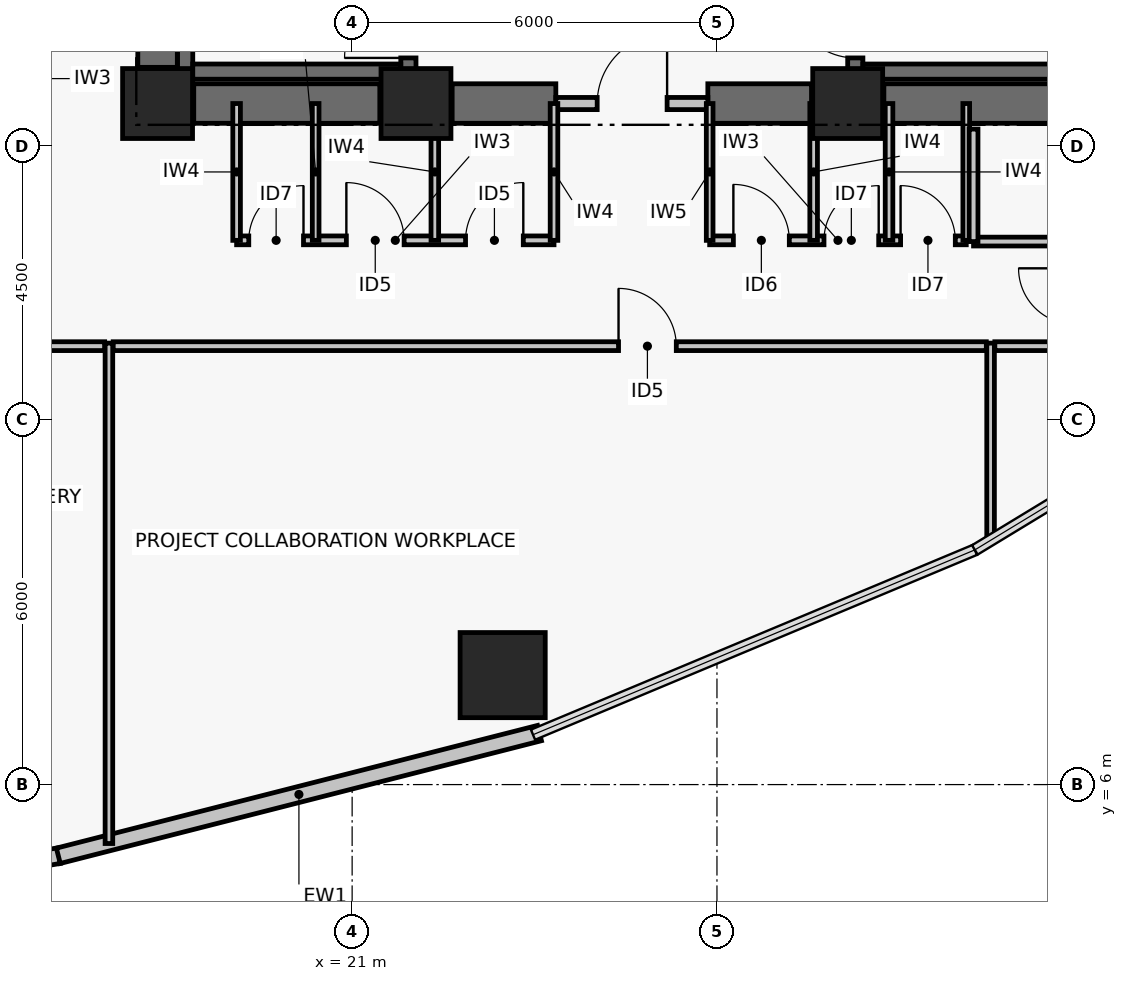
"""IFC4 building model, lengths in metres.
Left out: names, types, materials, properties, quantities, classifications, styles, units other than length and angle.
Written with IfcOpenShell. Run it as: python <this file> out.ifc"""

import sys

from ifc_helpers import new_model, si_unit, direction, frame, frame_2d, origin, origin_2d, place, context, subcontext, project, spatial, rectangle, hollow_rectangle, extrude, element, fill, save


model = new_model("IFC4")
c1 = context("Model", 3, precision=1e-05, world=origin(), true_north=direction((0.0, 1.0)))
c2 = subcontext(c1, "Body", "Model", "MODEL_VIEW")
j1 = project(units=[si_unit("LENGTHUNIT", "METRE"), si_unit("PLANEANGLEUNIT", "RADIAN")], contexts=[c1])
p1 = place(None, origin())
s1 = spatial("IfcSite", under=j1, at=p1, CompositionType="ELEMENT")
p2 = place(p1, origin())
s2 = spatial("IfcBuilding", under=s1, at=p2, CompositionType="ELEMENT")
p3 = place(p2, frame((0.0, 0.0, 7.2)))
s3 = spatial("IfcBuildingStorey", under=s2, at=p3, CompositionType="ELEMENT", Elevation=7.2)
for number, where, z_axis, x_axis in (
    (1, (17.8, 17.2, 0.0), (0.0, 0.0, 1.0), (1.0, 0.0, 0.0)),
    (2, (22.05, 17.2, 0.0), (0.0, 0.0, 1.0), (1.0, 0.0, 0.0)),
    (3, (29.15, 17.2, 0.0), (0.0, 0.0, 1.0), (1.0, 0.0, 0.0)),
):
    element("IfcColumn", number, at=place(p3, frame(where, z_axis=z_axis, x_axis=x_axis)), inside=s3, PredefinedType="COLUMN", context=c2, shape_type="SweptSolid", body=[
        extrude(rectangle(XDim=1.15, YDim=1.15, at=origin_2d()), origin(), (0.0, 0.0, 1.0), 4.8),
    ])
p4 = place(p3, frame((18.395, 17.2, 0.0), z_axis=(0.0, 0.0, 1.0), x_axis=(1.0, 0.0, 0.0)))
e4 = element("IfcWall", 4, at=p4, inside=s3, PredefinedType="SHEAR", context=c2, shape_type="SweptSolid", body=[
    extrude(rectangle(XDim=3.06, YDim=0.65, at=frame_2d((1.53, 0.0))), origin(), (0.0, 0.0, 1.0), 4.48),
])
p5 = place(p3, frame((22.645, 17.2, 0.0), z_axis=(0.0, 0.0, 1.0), x_axis=(1.0, 0.0, 0.0)))
e5 = element("IfcWall", 5, at=p5, inside=s3, PredefinedType="SHEAR", context=c2, shape_type="SweptSolid", body=[
    extrude(rectangle(XDim=1.705, YDim=0.65, at=frame_2d((0.853, 0.0))), origin(), (0.0, 0.0, 1.0), 4.48),
])
p6 = place(p3, frame((26.85, 17.2, 0.0), z_axis=(0.0, 0.0, 1.0), x_axis=(1.0, 0.0, 0.0)))
e6 = element("IfcWall", 6, at=p6, inside=s3, PredefinedType="SHEAR", context=c2, shape_type="SweptSolid", body=[
    extrude(rectangle(XDim=1.705, YDim=0.65, at=frame_2d((0.853, 0.0))), origin(), (0.0, 0.0, 1.0), 4.48),
])
p7 = place(p3, frame((29.745, 17.2, 0.0), z_axis=(0.0, 0.0, 1.0), x_axis=(1.0, 0.0, 0.0)))
e7 = element("IfcWall", 7, at=p7, inside=s3, PredefinedType="SHEAR", context=c2, shape_type="SweptSolid", body=[
    extrude(rectangle(XDim=3.06, YDim=0.65, at=frame_2d((1.53, 0.0))), origin(), (0.0, 0.0, 1.0), 4.48),
])
p8 = place(p3, frame((17.8, 17.795, 0.0), z_axis=(0.0, 0.0, 1.0), x_axis=(0.0, 1.0, 0.0)))
e8 = element("IfcWall", 8, at=p8, inside=s3, PredefinedType="SHEAR", context=c2, shape_type="SweptSolid", body=[
    extrude(rectangle(XDim=8.41, YDim=0.65, at=frame_2d((4.205, 0.0))), origin(), (0.0, 0.0, 1.0), 4.48),
])
p9 = place(p3, frame((18.254, 17.6, 0.0), z_axis=(0.0, 0.0, 1.0), x_axis=(0.0, 1.0, 0.0)))
e9 = element("IfcWall", 9, at=p9, inside=s3, PredefinedType="SHEAR", context=c2, shape_type="SweptSolid", body=[
    extrude(rectangle(XDim=8.8, YDim=0.25, at=frame_2d((4.4, 0.0))), origin(), (0.0, 0.0, 1.0), 4.48),
])
p10 = place(p3, frame((21.925, 17.6, 0.0), z_axis=(0.0, 0.0, 1.0), x_axis=(0.0, 1.0, 0.0)))
e10 = element("IfcWall", 10, at=p10, inside=s3, PredefinedType="SHEAR", context=c2, shape_type="SweptSolid", body=[
    extrude(rectangle(XDim=8.8, YDim=0.25, at=frame_2d((4.4, 0.0))), origin(), (0.0, 0.0, 1.0), 4.48),
])
p11 = place(p10, frame((0.35, 0.0, 0.0)))
e11 = element("IfcOpeningElement", 11, at=p11, cuts=e10, PredefinedType="OPENING", context=c2, shape_type="SweptSolid", body=[
    extrude(rectangle(XDim=1.05, YDim=2.08, at=frame_2d((0.525, 1.04))), frame((0.0, 0.135, 0.0), z_axis=(0.0, -1.0, 0.0), x_axis=(1.0, 0.0, 0.0)), (0.0, 0.0, 1.0), 0.27),
])
p12 = place(p3, frame((18.379, 17.725, 0.0), z_axis=(0.0, 0.0, 1.0), x_axis=(1.0, 0.0, 0.0)))
e12 = element("IfcWall", 12, at=p12, inside=s3, PredefinedType="SHEAR", context=c2, shape_type="SweptSolid", body=[
    extrude(rectangle(XDim=3.421, YDim=0.25, at=frame_2d((1.71, 0.0))), origin(), (0.0, 0.0, 1.0), 4.48),
])
p13 = place(p3, frame((29.275, 17.6, 0.0), z_axis=(0.0, 0.0, 1.0), x_axis=(0.0, 1.0, 0.0)))
e13 = element("IfcWall", 13, at=p13, inside=s3, PredefinedType="SHEAR", context=c2, shape_type="SweptSolid", body=[
    extrude(rectangle(XDim=8.8, YDim=0.25, at=frame_2d((4.4, 0.0))), origin(), (0.0, 0.0, 1.0), 4.48),
])
p14 = place(p13, frame((0.35, 0.0, 0.0)))
e14 = element("IfcOpeningElement", 14, at=p14, cuts=e13, PredefinedType="OPENING", context=c2, shape_type="SweptSolid", body=[
    extrude(rectangle(XDim=1.05, YDim=2.08, at=frame_2d((0.525, 1.04))), frame((0.0, 0.135, 0.0), z_axis=(0.0, -1.0, 0.0), x_axis=(1.0, 0.0, 0.0)), (0.0, 0.0, 1.0), 0.27),
])
p15 = place(p3, frame((29.4, 17.725, 0.0), z_axis=(0.0, 0.0, 1.0), x_axis=(1.0, 0.0, 0.0)))
e15 = element("IfcWall", 15, at=p15, inside=s3, PredefinedType="SHEAR", context=c2, shape_type="SweptSolid", body=[
    extrude(rectangle(XDim=3.421, YDim=0.25, at=frame_2d((1.71, 0.0))), origin(), (0.0, 0.0, 1.0), 4.48),
])
p16 = place(p3, frame((23.476, 7.8, 0.0), z_axis=(0.0, 0.0, 1.0), x_axis=(1.0, 0.0, 0.0)))
e16 = element("IfcColumn", 16, at=p16, inside=s3, PredefinedType="COLUMN", context=c2, shape_type="SweptSolid", body=[
    extrude(hollow_rectangle(XDim=1.4, YDim=1.4, WallThickness=0.055, at=origin_2d()), origin(), (0.0, 0.0, 1.0), 4.8),
])
p17 = place(p3, frame((16.179, 4.831, 0.0), z_axis=(0.0, 0.0, 1.0), x_axis=(-0.985905166387, -0.167305119144, 0.0)))
e17 = element("IfcWall", 17, at=p17, inside=s3, PredefinedType="PARTITIONING", context=c2, shape_type="SweptSolid", body=[
    extrude(rectangle(XDim=3.064, YDim=0.26, at=frame_2d((1.532, 0.0))), origin(), (0.0, 0.0, 1.0), 4.48),
])
p18 = place(p3, frame((24.081, 6.847, 0.0), z_axis=(0.0, 0.0, 1.0), x_axis=(-0.968981557045, -0.247133045354, 0.0)))
e18 = element("IfcWall", 18, at=p18, inside=s3, PredefinedType="PARTITIONING", context=c2, shape_type="SweptSolid", body=[
    extrude(rectangle(XDim=8.167, YDim=0.26, at=frame_2d((4.083, 0.0))), origin(), (0.0, 0.0, 1.0), 4.48),
])
p19 = place(p3, frame((24.35, 17.2, 0.0), z_axis=(0.0, 0.0, 1.0), x_axis=(1.0, 0.0, 0.0)))
e19 = element("IfcWall", 19, at=p19, inside=s3, PredefinedType="PARTITIONING", context=c2, shape_type="SweptSolid", body=[
    extrude(rectangle(XDim=2.5, YDim=0.2, at=frame_2d((1.25, 0.0))), origin(), (0.0, 0.0, 1.0), 3.61),
])
p20 = place(p19, frame((0.68, 0.0, 0.0)))
e20 = element("IfcOpeningElement", 20, at=p20, cuts=e19, PredefinedType="OPENING", context=c2, shape_type="SweptSolid", body=[
    extrude(rectangle(XDim=1.15, YDim=2.08, at=frame_2d((0.575, 1.04))), frame((0.0, 0.11, 0.0), z_axis=(0.0, -1.0, 0.0), x_axis=(1.0, 0.0, 0.0)), (0.0, 0.0, 1.0), 0.22),
])
p21 = place(p3, frame((19.1, 14.95, 0.0), z_axis=(0.0, 0.0, 1.0), x_axis=(1.0, 0.0, 0.0)))
e21 = element("IfcWall", 21, at=p21, inside=s3, PredefinedType="PARTITIONING", context=c2, shape_type="SweptSolid", body=[
    extrude(rectangle(XDim=5.22, YDim=0.145, at=frame_2d((2.61, 0.0))), origin(), (0.0, 0.0, 1.0), 3.56),
])
p22 = place(p21, frame((0.2, 0.0, 0.0)))
e22 = element("IfcOpeningElement", 22, at=p22, cuts=e21, PredefinedType="OPENING", context=c2, shape_type="SweptSolid", body=[
    extrude(rectangle(XDim=0.9, YDim=2.02, at=frame_2d((0.45, 1.01))), frame((0.0, 0.083, 0.0), z_axis=(0.0, -1.0, 0.0), x_axis=(1.0, 0.0, 0.0)), (0.0, 0.0, 1.0), 0.165),
])
p23 = place(p21, frame((1.805, 0.0, 0.0)))
e23 = element("IfcOpeningElement", 23, at=p23, cuts=e21, PredefinedType="OPENING", context=c2, shape_type="SweptSolid", body=[
    extrude(rectangle(XDim=0.95, YDim=2.06, at=frame_2d((0.475, 1.03))), frame((0.0, 0.083, 0.0), z_axis=(0.0, -1.0, 0.0), x_axis=(1.0, 0.0, 0.0)), (0.0, 0.0, 1.0), 0.165),
])
p24 = place(p21, frame((3.765, 0.0, 0.0)))
e24 = element("IfcOpeningElement", 24, at=p24, cuts=e21, PredefinedType="OPENING", context=c2, shape_type="SweptSolid", body=[
    extrude(rectangle(XDim=0.95, YDim=2.06, at=frame_2d((0.475, 1.03))), frame((0.0, 0.083, 0.0), z_axis=(0.0, -1.0, 0.0), x_axis=(1.0, 0.0, 0.0)), (0.0, 0.0, 1.0), 0.165),
])
p25 = place(p3, frame((26.88, 14.95, 0.0), z_axis=(0.0, 0.0, 1.0), x_axis=(1.0, 0.0, 0.0)))
e25 = element("IfcWall", 25, at=p25, inside=s3, PredefinedType="PARTITIONING", context=c2, shape_type="SweptSolid", body=[
    extrude(rectangle(XDim=4.22, YDim=0.145, at=frame_2d((2.11, 0.0))), origin(), (0.0, 0.0, 1.0), 4.01),
])
p26 = place(p25, frame((0.39, 0.0, 0.0)))
e26 = element("IfcOpeningElement", 26, at=p26, cuts=e25, PredefinedType="OPENING", context=c2, shape_type="SweptSolid", body=[
    extrude(rectangle(XDim=0.92, YDim=2.05, at=frame_2d((0.46, 1.025))), frame((0.0, 0.083, 0.0), z_axis=(0.0, -1.0, 0.0), x_axis=(1.0, 0.0, 0.0)), (0.0, 0.0, 1.0), 0.165),
])
p27 = place(p25, frame((1.88, 0.0, 0.0)))
e27 = element("IfcOpeningElement", 27, at=p27, cuts=e25, PredefinedType="OPENING", context=c2, shape_type="SweptSolid", body=[
    extrude(rectangle(XDim=0.9, YDim=2.02, at=frame_2d((0.45, 1.01))), frame((0.0, 0.083, 0.0), z_axis=(0.0, -1.0, 0.0), x_axis=(1.0, 0.0, 0.0)), (0.0, 0.0, 1.0), 0.165),
])
p28 = place(p25, frame((3.14, 0.0, 0.0)))
e28 = element("IfcOpeningElement", 28, at=p28, cuts=e25, PredefinedType="OPENING", context=c2, shape_type="SweptSolid", body=[
    extrude(rectangle(XDim=0.9, YDim=2.02, at=frame_2d((0.45, 1.01))), frame((0.0, 0.083, 0.0), z_axis=(0.0, -1.0, 0.0), x_axis=(1.0, 0.0, 0.0)), (0.0, 0.0, 1.0), 0.165),
])
p29 = place(p3, frame((19.1, 14.95, 0.0), z_axis=(0.0, 0.0, 1.0), x_axis=(0.0, 1.0, 0.0)))
e29 = element("IfcWall", 29, at=p29, inside=s3, PredefinedType="PARTITIONING", context=c2, shape_type="SweptSolid", body=[
    extrude(rectangle(XDim=2.25, YDim=0.125, at=frame_2d((1.125, 0.0))), origin(), (0.0, 0.0, 1.0), 3.61),
])
p30 = place(p3, frame((20.4, 14.95, 0.0), z_axis=(0.0, 0.0, 1.0), x_axis=(0.0, 1.0, 0.0)))
e30 = element("IfcWall", 30, at=p30, inside=s3, PredefinedType="PARTITIONING", context=c2, shape_type="SweptSolid", body=[
    extrude(rectangle(XDim=2.25, YDim=0.11, at=frame_2d((1.125, 0.0))), origin(), (0.0, 0.0, 1.0), 3.61),
])
p31 = place(p3, frame((22.36, 14.95, 0.0), z_axis=(0.0, 0.0, 1.0), x_axis=(0.0, 1.0, 0.0)))
e31 = element("IfcWall", 31, at=p31, inside=s3, PredefinedType="PARTITIONING", context=c2, shape_type="SweptSolid", body=[
    extrude(rectangle(XDim=2.25, YDim=0.125, at=frame_2d((1.125, 0.0))), origin(), (0.0, 0.0, 1.0), 3.56),
])
p32 = place(p3, frame((24.32, 14.95, 0.0), z_axis=(0.0, 0.0, 1.0), x_axis=(0.0, 1.0, 0.0)))
e32 = element("IfcWall", 32, at=p32, inside=s3, PredefinedType="PARTITIONING", context=c2, shape_type="SweptSolid", body=[
    extrude(rectangle(XDim=2.25, YDim=0.125, at=frame_2d((1.125, 0.0))), origin(), (0.0, 0.0, 1.0), 3.61),
])
p33 = place(p3, frame((26.88, 14.95, 0.0), z_axis=(0.0, 0.0, 1.0), x_axis=(0.0, 1.0, 0.0)))
e33 = element("IfcWall", 33, at=p33, inside=s3, PredefinedType="PARTITIONING", context=c2, shape_type="SweptSolid", body=[
    extrude(rectangle(XDim=2.25, YDim=0.11, at=frame_2d((1.125, 0.0))), origin(), (0.0, 0.0, 1.0), 3.61),
])
for number, where, z_axis, x_axis in (
    (34, (28.59, 14.95, 0.0), (0.0, 0.0, 1.0), (0.0, 1.0, 0.0)),
    (35, (29.83, 14.95, 0.0), (0.0, 0.0, 1.0), (0.0, 1.0, 0.0)),
):
    element("IfcWall", number, at=place(p3, frame(where, z_axis=z_axis, x_axis=x_axis)), inside=s3, PredefinedType="PARTITIONING", context=c2, shape_type="SweptSolid", body=[
        extrude(rectangle(XDim=2.25, YDim=0.125, at=frame_2d((1.125, 0.0))), origin(), (0.0, 0.0, 1.0), 3.61),
    ])
p34 = place(p3, frame((31.1, 14.95, 0.0), z_axis=(0.0, 0.0, 1.0), x_axis=(0.0, 1.0, 0.0)))
e36 = element("IfcWall", 36, at=p34, inside=s3, PredefinedType="PARTITIONING", context=c2, shape_type="SweptSolid", body=[
    extrude(rectangle(XDim=2.25, YDim=0.11, at=frame_2d((1.125, 0.0))), origin(), (0.0, 0.0, 1.0), 3.61),
])
p35 = place(p3, frame((15.9, 13.21, 0.0), z_axis=(0.0, 0.0, 1.0), x_axis=(1.0, 0.0, 0.0)))
e37 = element("IfcWall", 37, at=p35, inside=s3, PredefinedType="PARTITIONING", context=c2, shape_type="SweptSolid", body=[
    extrude(rectangle(XDim=1.03, YDim=0.145, at=frame_2d((0.515, 0.0))), origin(), (0.0, 0.0, 1.0), 3.56),
])
p36 = place(p3, frame((17.07, 13.21, 0.0), z_axis=(0.0, 0.0, 1.0), x_axis=(1.0, 0.0, 0.0)))
e38 = element("IfcWall", 38, at=p36, inside=s3, PredefinedType="PARTITIONING", context=c2, shape_type="SweptSolid", body=[
    extrude(rectangle(XDim=14.36, YDim=0.145, at=frame_2d((7.18, 0.0))), origin(), (0.0, 0.0, 1.0), 3.56),
])
p37 = place(p36, frame((8.311, 0.0, 0.0)))
e39 = element("IfcOpeningElement", 39, at=p37, cuts=e38, PredefinedType="OPENING", context=c2, shape_type="SweptSolid", body=[
    extrude(rectangle(XDim=0.95, YDim=2.06, at=frame_2d((0.475, 1.03))), frame((0.0, 0.083, 0.0), z_axis=(0.0, -1.0, 0.0), x_axis=(1.0, 0.0, 0.0)), (0.0, 0.0, 1.0), 0.165),
])
p38 = place(p3, frame((31.57, 13.21, 0.0), z_axis=(0.0, 0.0, 1.0), x_axis=(1.0, 0.0, 0.0)))
e40 = element("IfcWall", 40, at=p38, inside=s3, PredefinedType="PARTITIONING", context=c2, shape_type="SweptSolid", body=[
    extrude(rectangle(XDim=1.23, YDim=0.145, at=frame_2d((0.615, 0.0))), origin(), (0.0, 0.0, 1.0), 4.01),
])
p39 = place(p3, frame((32.8, 14.93, 0.0), z_axis=(0.0, 0.0, 1.0), x_axis=(-1.0, 0.0, 0.0)))
e41 = element("IfcWall", 41, at=p39, inside=s3, PredefinedType="PARTITIONING", context=c2, shape_type="SweptSolid", body=[
    extrude(rectangle(XDim=1.58, YDim=0.145, at=frame_2d((0.79, 0.0))), origin(), (0.0, 0.0, 1.0), 4.01),
])
p40 = place(p3, frame((31.22, 14.93, 0.0), z_axis=(0.0, 0.0, 1.0), x_axis=(0.0, 1.0, 0.0)))
e42 = element("IfcWall", 42, at=p40, inside=s3, PredefinedType="PARTITIONING", context=c2, shape_type="SweptSolid", body=[
    extrude(rectangle(XDim=1.85, YDim=0.145, at=frame_2d((0.925, 0.0))), origin(), (0.0, 0.0, 1.0), 3.61),
])
p41 = place(p3, frame((17.0, 5.031, 0.0), z_axis=(0.0, 0.0, 1.0), x_axis=(0.0, 1.0, 0.0)))
e43 = element("IfcWall", 43, at=p41, inside=s3, PredefinedType="PARTITIONING", context=c2, shape_type="SweptSolid", body=[
    extrude(rectangle(XDim=8.229, YDim=0.125, at=frame_2d((4.115, 0.0))), origin(), (0.0, 0.0, 1.0), 3.86),
])
p42 = place(p3, frame((31.5, 10.005, 0.0), z_axis=(0.0, 0.0, 1.0), x_axis=(0.0, 1.0, 0.0)))
e44 = element("IfcWall", 44, at=p42, inside=s3, PredefinedType="PARTITIONING", context=c2, shape_type="SweptSolid", body=[
    extrude(rectangle(XDim=3.255, YDim=0.125, at=frame_2d((1.627, 0.0))), origin(), (0.0, 0.0, 1.0), 3.86),
])
p43 = place(p11, origin())
e45 = element("IfcDoor", 45, at=p43, inside=s3, OperationType="SINGLE_SWING_LEFT", PredefinedType="DOOR", context=c2, shape_type="SweptSolid", body=[
    extrude(rectangle(XDim=1.05, YDim=2.08, at=frame_2d((0.525, 1.04))), frame((0.0, 0.025, 0.0), z_axis=(0.0, -1.0, 0.0), x_axis=(1.0, 0.0, 0.0)), (0.0, 0.0, 1.0), 0.05),
])
fill(e11, e45)
p44 = place(p14, origin())
e46 = element("IfcDoor", 46, at=p44, inside=s3, OperationType="SINGLE_SWING_RIGHT", PredefinedType="DOOR", context=c2, shape_type="SweptSolid", body=[
    extrude(rectangle(XDim=1.05, YDim=2.08, at=frame_2d((0.525, 1.04))), frame((0.0, 0.025, 0.0), z_axis=(0.0, -1.0, 0.0), x_axis=(1.0, 0.0, 0.0)), (0.0, 0.0, 1.0), 0.05),
])
fill(e14, e46)
p45 = place(p20, origin())
e47 = element("IfcDoor", 47, at=p45, inside=s3, OperationType="SINGLE_SWING_RIGHT", PredefinedType="DOOR", context=c2, shape_type="SweptSolid", body=[
    extrude(rectangle(XDim=1.15, YDim=2.08, at=frame_2d((0.575, 1.04))), frame((0.0, 0.025, 0.0), z_axis=(0.0, -1.0, 0.0), x_axis=(1.0, 0.0, 0.0)), (0.0, 0.0, 1.0), 0.05),
])
fill(e20, e47)
p46 = place(p22, origin())
e48 = element("IfcDoor", 48, at=p46, inside=s3, OperationType="SINGLE_SWING_RIGHT", PredefinedType="DOOR", context=c2, shape_type="SweptSolid", body=[
    extrude(rectangle(XDim=0.9, YDim=2.02, at=frame_2d((0.45, 1.01))), frame((0.0, 0.025, 0.0), z_axis=(0.0, -1.0, 0.0), x_axis=(1.0, 0.0, 0.0)), (0.0, 0.0, 1.0), 0.05),
])
fill(e22, e48)
p47 = place(p23, origin())
e49 = element("IfcDoor", 49, at=p47, inside=s3, OperationType="SINGLE_SWING_LEFT", PredefinedType="DOOR", context=c2, shape_type="SweptSolid", body=[
    extrude(rectangle(XDim=0.95, YDim=2.06, at=frame_2d((0.475, 1.03))), frame((0.0, 0.025, 0.0), z_axis=(0.0, -1.0, 0.0), x_axis=(1.0, 0.0, 0.0)), (0.0, 0.0, 1.0), 0.05),
])
fill(e23, e49)
p48 = place(p24, origin())
e50 = element("IfcDoor", 50, at=p48, inside=s3, OperationType="SINGLE_SWING_RIGHT", PredefinedType="DOOR", context=c2, shape_type="SweptSolid", body=[
    extrude(rectangle(XDim=0.95, YDim=2.06, at=frame_2d((0.475, 1.03))), frame((0.0, 0.025, 0.0), z_axis=(0.0, -1.0, 0.0), x_axis=(1.0, 0.0, 0.0)), (0.0, 0.0, 1.0), 0.05),
])
fill(e24, e50)
p49 = place(p26, origin())
e51 = element("IfcDoor", 51, at=p49, inside=s3, OperationType="SINGLE_SWING_LEFT", PredefinedType="DOOR", context=c2, shape_type="SweptSolid", body=[
    extrude(rectangle(XDim=0.92, YDim=2.05, at=frame_2d((0.46, 1.025))), frame((0.0, 0.025, 0.0), z_axis=(0.0, -1.0, 0.0), x_axis=(1.0, 0.0, 0.0)), (0.0, 0.0, 1.0), 0.05),
])
fill(e26, e51)
p50 = place(p27, origin())
e52 = element("IfcDoor", 52, at=p50, inside=s3, OperationType="SINGLE_SWING_RIGHT", PredefinedType="DOOR", context=c2, shape_type="SweptSolid", body=[
    extrude(rectangle(XDim=0.9, YDim=2.02, at=frame_2d((0.45, 1.01))), frame((0.0, 0.025, 0.0), z_axis=(0.0, -1.0, 0.0), x_axis=(1.0, 0.0, 0.0)), (0.0, 0.0, 1.0), 0.05),
])
fill(e27, e52)
p51 = place(p28, origin())
e53 = element("IfcDoor", 53, at=p51, inside=s3, OperationType="SINGLE_SWING_LEFT", PredefinedType="DOOR", context=c2, shape_type="SweptSolid", body=[
    extrude(rectangle(XDim=0.9, YDim=2.02, at=frame_2d((0.45, 1.01))), frame((0.0, 0.025, 0.0), z_axis=(0.0, -1.0, 0.0), x_axis=(1.0, 0.0, 0.0)), (0.0, 0.0, 1.0), 0.05),
])
fill(e28, e53)
p52 = place(p37, origin())
e54 = element("IfcDoor", 54, at=p52, inside=s3, OperationType="SINGLE_SWING_LEFT", PredefinedType="DOOR", context=c2, shape_type="SweptSolid", body=[
    extrude(rectangle(XDim=0.95, YDim=2.06, at=frame_2d((0.475, 1.03))), frame((0.0, 0.025, 0.0), z_axis=(0.0, -1.0, 0.0), x_axis=(1.0, 0.0, 0.0)), (0.0, 0.0, 1.0), 0.05),
])
fill(e39, e54)
save(model, sys.argv[1])
